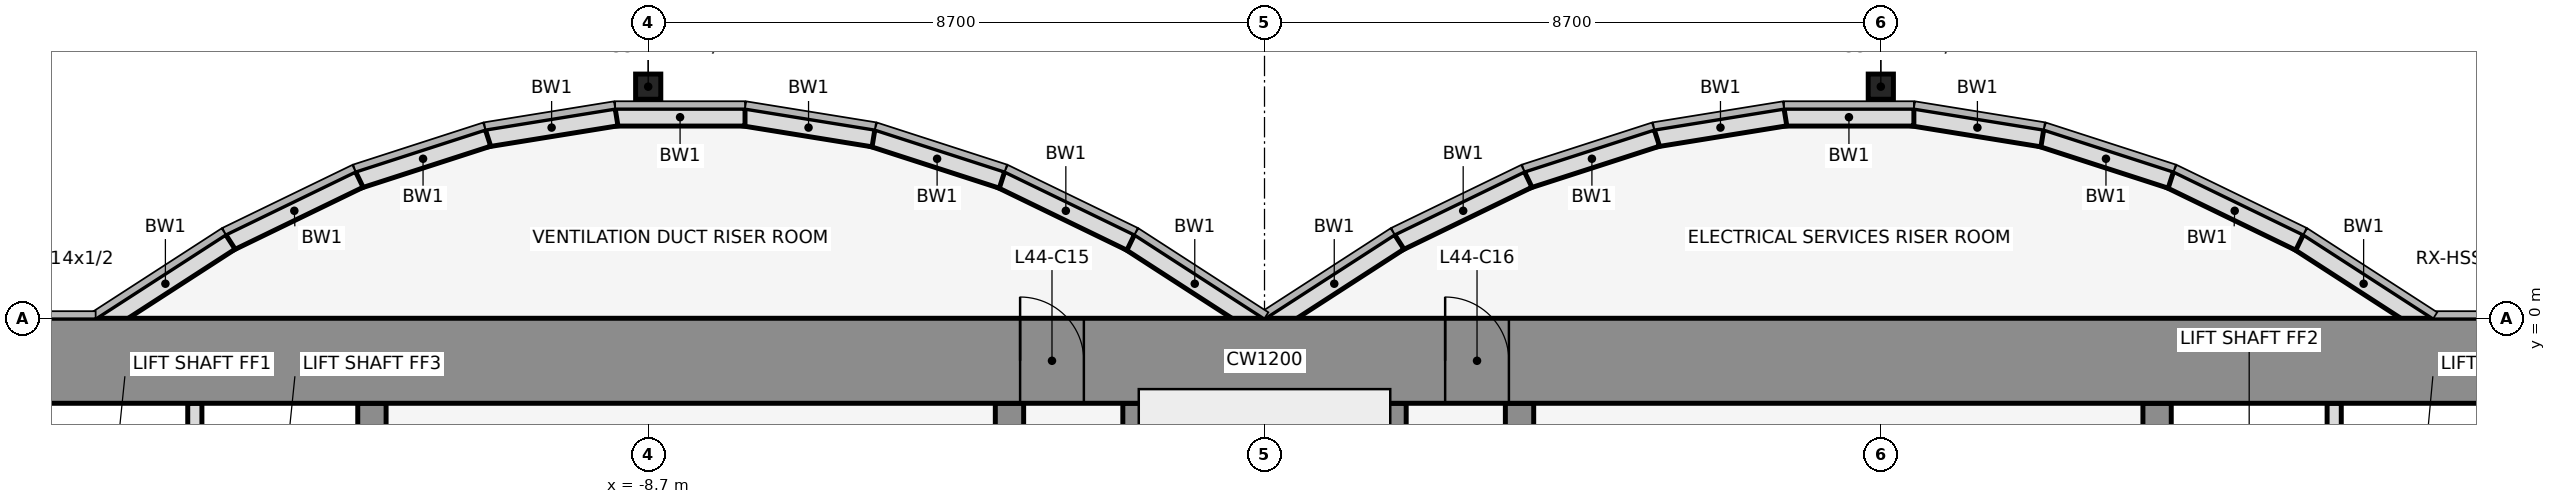
"""IFC4 building model, lengths in metres.
Left out: names, types, materials, properties, quantities, classifications, styles, units other than length and angle.
Written with IfcOpenShell. Run it as: python <this file> out.ifc"""

import sys

from ifc_helpers import new_model, si_unit, direction, frame, frame_2d, origin, origin_2d, place, context, subcontext, project, spatial, rectangle, hollow_rectangle, extrude, element, fill, save


model = new_model("IFC4")
c1 = context("Model", 3, precision=1e-05, world=origin(), true_north=direction((0.0, 1.0)))
c2 = subcontext(c1, "Body", "Model", "MODEL_VIEW")
j1 = project(units=[si_unit("LENGTHUNIT", "METRE"), si_unit("PLANEANGLEUNIT", "RADIAN")], contexts=[c1])
p1 = place(None, origin())
s1 = spatial("IfcSite", under=j1, at=p1, CompositionType="ELEMENT")
p2 = place(p1, origin())
s2 = spatial("IfcBuilding", under=s1, at=p2, CompositionType="ELEMENT")
p3 = place(p2, frame((0.0, 0.0, 199.1)))
s3 = spatial("IfcBuildingStorey", under=s2, at=p3, CompositionType="ELEMENT", Elevation=199.1)
for number, where, z_axis, x_axis in (
    (1, (-8.7, 3.269, 0.0), (0.0, 0.0, 1.0), (1.0, 0.0, 0.0)),
    (2, (8.7, 3.269, 0.0), (0.0, 0.0, 1.0), (1.0, 0.0, 0.0)),
):
    element("IfcColumn", number, at=place(p3, frame(where, z_axis=z_axis, x_axis=x_axis)), inside=s3, PredefinedType="COLUMN", context=c2, shape_type="SweptSolid", body=[
        extrude(hollow_rectangle(XDim=0.356, YDim=0.356, WallThickness=0.012, at=origin_2d()), origin(), (0.0, 0.0, 1.0), 4.1),
    ])
p4 = place(p3, frame((16.432, -0.105, 0.0), z_axis=(0.0, 0.0, 1.0), x_axis=(-0.83981312244, 0.542875602121, 0.0)))
e3 = element("IfcWall", 3, at=p4, inside=s3, PredefinedType="STANDARD", context=c2, shape_type="SweptSolid", body=[
    extrude(rectangle(XDim=2.183, YDim=0.25, at=frame_2d((1.091, 0.0))), origin(), (0.0, 0.0, 1.0), 3.95),
])
p5 = place(p3, frame((14.612, 1.073, 0.0), z_axis=(0.0, 0.0, 1.0), x_axis=(-0.89982408427, 0.436252928206, 0.0)))
e4 = element("IfcWall", 4, at=p5, inside=s3, PredefinedType="STANDARD", context=c2, shape_type="SweptSolid", body=[
    extrude(rectangle(XDim=2.038, YDim=0.25, at=frame_2d((1.019, 0.0))), origin(), (0.0, 0.0, 1.0), 3.95),
])
p6 = place(p3, frame((12.795, 1.955, 0.0), z_axis=(0.0, 0.0, 1.0), x_axis=(-0.951495806175, 0.307661714928, 0.0)))
e5 = element("IfcWall", 5, at=p6, inside=s3, PredefinedType="STANDARD", context=c2, shape_type="SweptSolid", body=[
    extrude(rectangle(XDim=1.927, YDim=0.25, at=frame_2d((0.963, 0.0))), origin(), (0.0, 0.0, 1.0), 3.95),
])
p7 = place(p3, frame((10.98, 2.543, 0.0), z_axis=(0.0, 0.0, 1.0), x_axis=(-0.987181718931, 0.159600293885, 0.0)))
e6 = element("IfcWall", 6, at=p7, inside=s3, PredefinedType="STANDARD", context=c2, shape_type="SweptSolid", body=[
    extrude(rectangle(XDim=1.857, YDim=0.25, at=frame_2d((0.929, 0.0))), origin(), (0.0, 0.0, 1.0), 3.95),
])
p8 = place(p3, frame((9.167, 2.838, 0.0), z_axis=(0.0, 0.0, 1.0), x_axis=(-1.0, 0.0, 0.0)))
e7 = element("IfcWall", 7, at=p8, inside=s3, PredefinedType="STANDARD", context=c2, shape_type="SweptSolid", body=[
    extrude(rectangle(XDim=1.833, YDim=0.25, at=frame_2d((0.917, 0.0))), origin(), (0.0, 0.0, 1.0), 3.95),
])
p9 = place(p3, frame((7.353, 2.84, 0.0), z_axis=(0.0, 0.0, 1.0), x_axis=(-0.987181718931, -0.159600293885, 0.0)))
e8 = element("IfcWall", 8, at=p9, inside=s3, PredefinedType="STANDARD", context=c2, shape_type="SweptSolid", body=[
    extrude(rectangle(XDim=1.857, YDim=0.25, at=frame_2d((0.929, 0.0))), origin(), (0.0, 0.0, 1.0), 3.95),
])
p10 = place(p3, frame((5.538, 2.548, 0.0), z_axis=(0.0, 0.0, 1.0), x_axis=(-0.951495806175, -0.307661714928, 0.0)))
e9 = element("IfcWall", 9, at=p10, inside=s3, PredefinedType="STANDARD", context=c2, shape_type="SweptSolid", body=[
    extrude(rectangle(XDim=1.927, YDim=0.25, at=frame_2d((0.963, 0.0))), origin(), (0.0, 0.0, 1.0), 3.95),
])
p11 = place(p3, frame((3.721, 1.962, 0.0), z_axis=(0.0, 0.0, 1.0), x_axis=(-0.89982408427, -0.436252928206, 0.0)))
e10 = element("IfcWall", 10, at=p11, inside=s3, PredefinedType="STANDARD", context=c2, shape_type="SweptSolid", body=[
    extrude(rectangle(XDim=2.038, YDim=0.25, at=frame_2d((1.019, 0.0))), origin(), (0.0, 0.0, 1.0), 3.95),
])
for number, where, z_axis, x_axis in (
    (11, (1.901, 1.08, 0.0), (0.0, 0.0, 1.0), (-0.84, -0.543, 0.0)),
    (12, (-0.068, -0.105, 0.0), (0.0, 0.0, 1.0), (-0.84, 0.543, 0.0)),
):
    element("IfcWall", number, at=place(p3, frame(where, z_axis=z_axis, x_axis=x_axis)), inside=s3, PredefinedType="STANDARD", context=c2, shape_type="SweptSolid", body=[
        extrude(rectangle(XDim=2.183, YDim=0.25, at=frame_2d((1.091, 0.0))), origin(), (0.0, 0.0, 1.0), 3.95),
    ])
p12 = place(p3, frame((-1.888, 1.073, 0.0), z_axis=(0.0, 0.0, 1.0), x_axis=(-0.89982408427, 0.436252928206, 0.0)))
e13 = element("IfcWall", 13, at=p12, inside=s3, PredefinedType="STANDARD", context=c2, shape_type="SweptSolid", body=[
    extrude(rectangle(XDim=2.038, YDim=0.25, at=frame_2d((1.019, 0.0))), origin(), (0.0, 0.0, 1.0), 3.95),
])
p13 = place(p3, frame((-3.705, 1.955, 0.0), z_axis=(0.0, 0.0, 1.0), x_axis=(-0.951495806175, 0.307661714928, 0.0)))
e14 = element("IfcWall", 14, at=p13, inside=s3, PredefinedType="STANDARD", context=c2, shape_type="SweptSolid", body=[
    extrude(rectangle(XDim=1.927, YDim=0.25, at=frame_2d((0.963, 0.0))), origin(), (0.0, 0.0, 1.0), 3.95),
])
p14 = place(p3, frame((-5.52, 2.543, 0.0), z_axis=(0.0, 0.0, 1.0), x_axis=(-0.987181718931, 0.159600293885, 0.0)))
e15 = element("IfcWall", 15, at=p14, inside=s3, PredefinedType="STANDARD", context=c2, shape_type="SweptSolid", body=[
    extrude(rectangle(XDim=1.857, YDim=0.25, at=frame_2d((0.929, 0.0))), origin(), (0.0, 0.0, 1.0), 3.95),
])
p15 = place(p3, frame((-7.333, 2.838, 0.0), z_axis=(0.0, 0.0, 1.0), x_axis=(-1.0, 0.0, 0.0)))
e16 = element("IfcWall", 16, at=p15, inside=s3, PredefinedType="STANDARD", context=c2, shape_type="SweptSolid", body=[
    extrude(rectangle(XDim=1.833, YDim=0.25, at=frame_2d((0.917, 0.0))), origin(), (0.0, 0.0, 1.0), 3.95),
])
p16 = place(p3, frame((-9.147, 2.84, 0.0), z_axis=(0.0, 0.0, 1.0), x_axis=(-0.987181718931, -0.159600293885, 0.0)))
e17 = element("IfcWall", 17, at=p16, inside=s3, PredefinedType="STANDARD", context=c2, shape_type="SweptSolid", body=[
    extrude(rectangle(XDim=1.857, YDim=0.25, at=frame_2d((0.929, 0.0))), origin(), (0.0, 0.0, 1.0), 3.95),
])
p17 = place(p3, frame((-10.962, 2.548, 0.0), z_axis=(0.0, 0.0, 1.0), x_axis=(-0.951495806175, -0.307661714928, 0.0)))
e18 = element("IfcWall", 18, at=p17, inside=s3, PredefinedType="STANDARD", context=c2, shape_type="SweptSolid", body=[
    extrude(rectangle(XDim=1.927, YDim=0.25, at=frame_2d((0.963, 0.0))), origin(), (0.0, 0.0, 1.0), 3.95),
])
p18 = place(p3, frame((-12.779, 1.962, 0.0), z_axis=(0.0, 0.0, 1.0), x_axis=(-0.89982408427, -0.436252928206, 0.0)))
e19 = element("IfcWall", 19, at=p18, inside=s3, PredefinedType="STANDARD", context=c2, shape_type="SweptSolid", body=[
    extrude(rectangle(XDim=2.038, YDim=0.25, at=frame_2d((1.019, 0.0))), origin(), (0.0, 0.0, 1.0), 3.95),
])
p19 = place(p3, frame((-14.599, 1.08, 0.0), z_axis=(0.0, 0.0, 1.0), x_axis=(-0.83981312244, -0.542875602121, 0.0)))
e20 = element("IfcWall", 20, at=p19, inside=s3, PredefinedType="STANDARD", context=c2, shape_type="SweptSolid", body=[
    extrude(rectangle(XDim=2.183, YDim=0.25, at=frame_2d((1.091, 0.0))), origin(), (0.0, 0.0, 1.0), 3.95),
])
p20 = place(p3, frame((-15.1, -4.6, 0.0), z_axis=(0.0, 0.0, 1.0), x_axis=(0.0, 1.0, 0.0)))
e21 = element("IfcWall", 21, at=p20, inside=s3, PredefinedType="PARTITIONING", context=c2, shape_type="SweptSolid", body=[
    extrude(rectangle(XDim=3.4, YDim=0.2, at=frame_2d((1.7, 0.0))), origin(), (0.0, 0.0, 1.0), 2.84),
])
p21 = place(p3, frame((-12.6, -11.8, 0.0), z_axis=(0.0, 0.0, 1.0), x_axis=(0.0, 1.0, 0.0)))
e22 = element("IfcWall", 22, at=p21, inside=s3, PredefinedType="SHEAR", context=c2, shape_type="SweptSolid", body=[
    extrude(rectangle(XDim=10.6, YDim=0.4, at=frame_2d((5.3, 0.0))), origin(), (0.0, 0.0, 1.0), 4.1),
])
p22 = place(p21, frame((4.75, 0.0, 0.0)))
e23 = element("IfcOpeningElement", 23, at=p22, cuts=e22, PredefinedType="OPENING", context=c2, shape_type="SweptSolid", body=[
    extrude(rectangle(XDim=1.1, YDim=2.1, at=frame_2d((0.55, 1.05))), frame((0.0, 0.212, 0.0), z_axis=(0.0, -1.0, 0.0), x_axis=(1.0, 0.0, 0.0)), (0.0, 0.0, 1.0), 0.424),
])
p23 = place(p3, frame((-3.6, -11.8, 0.0), z_axis=(0.0, 0.0, 1.0), x_axis=(0.0, 1.0, 0.0)))
e24 = element("IfcWall", 24, at=p23, inside=s3, PredefinedType="SHEAR", context=c2, shape_type="SweptSolid", body=[
    extrude(rectangle(XDim=10.6, YDim=0.4, at=frame_2d((5.3, 0.0))), origin(), (0.0, 0.0, 1.0), 4.1),
])
p24 = place(p23, frame((4.85, 0.0, 0.0)))
e25 = element("IfcOpeningElement", 25, at=p24, cuts=e24, PredefinedType="OPENING", context=c2, shape_type="SweptSolid", body=[
    extrude(rectangle(XDim=0.9, YDim=2.1, at=frame_2d((0.45, 1.05))), frame((0.0, 0.212, 0.0), z_axis=(0.0, -1.0, 0.0), x_axis=(1.0, 0.0, 0.0)), (0.0, 0.0, 1.0), 0.424),
])
for number, where, z_axis, x_axis in (
    (26, (-1.8, -11.8, 0.0), (0.0, 0.0, 1.0), (0.0, 1.0, 0.0)),
    (27, (1.8, -11.8, 0.0), (0.0, 0.0, 1.0), (0.0, 1.0, 0.0)),
):
    element("IfcWall", number, at=place(p3, frame(where, z_axis=z_axis, x_axis=x_axis)), inside=s3, PredefinedType="SHEAR", context=c2, shape_type="SweptSolid", body=[
        extrude(rectangle(XDim=10.6, YDim=0.4, at=frame_2d((5.3, 0.0))), origin(), (0.0, 0.0, 1.0), 4.1),
    ])
p25 = place(p3, frame((3.6, -11.8, 0.0), z_axis=(0.0, 0.0, 1.0), x_axis=(0.0, 1.0, 0.0)))
e28 = element("IfcWall", 28, at=p25, inside=s3, PredefinedType="SHEAR", context=c2, shape_type="SweptSolid", body=[
    extrude(rectangle(XDim=10.6, YDim=0.4, at=frame_2d((5.3, 0.0))), origin(), (0.0, 0.0, 1.0), 4.1),
])
p26 = place(p25, frame((1.35, 0.0, 0.0)))
e29 = element("IfcOpeningElement", 29, at=p26, cuts=e28, PredefinedType="OPENING", context=c2, shape_type="SweptSolid", body=[
    extrude(rectangle(XDim=0.9, YDim=2.1, at=frame_2d((0.45, 1.05))), frame((0.0, 0.212, 0.0), z_axis=(0.0, -1.0, 0.0), x_axis=(1.0, 0.0, 0.0)), (0.0, 0.0, 1.0), 0.424),
])
p27 = place(p3, frame((12.6, -11.8, 0.0), z_axis=(0.0, 0.0, 1.0), x_axis=(0.0, 1.0, 0.0)))
e30 = element("IfcWall", 30, at=p27, inside=s3, PredefinedType="SHEAR", context=c2, shape_type="SweptSolid", body=[
    extrude(rectangle(XDim=10.6, YDim=0.4, at=frame_2d((5.3, 0.0))), origin(), (0.0, 0.0, 1.0), 4.1),
])
p28 = place(p27, frame((1.25, 0.0, 0.0)))
e31 = element("IfcOpeningElement", 31, at=p28, cuts=e30, PredefinedType="OPENING", context=c2, shape_type="SweptSolid", body=[
    extrude(rectangle(XDim=1.2, YDim=2.1, at=frame_2d((0.6, 1.05))), frame((0.0, 0.212, 0.0), z_axis=(0.0, -1.0, 0.0), x_axis=(1.0, 0.0, 0.0)), (0.0, 0.0, 1.0), 0.424),
])
p29 = place(p27, frame((4.75, 0.0, 0.0)))
e32 = element("IfcOpeningElement", 32, at=p29, cuts=e30, PredefinedType="OPENING", context=c2, shape_type="SweptSolid", body=[
    extrude(rectangle(XDim=1.1, YDim=2.1, at=frame_2d((0.55, 1.05))), frame((0.0, 0.212, 0.0), z_axis=(0.0, -1.0, 0.0), x_axis=(1.0, 0.0, 0.0)), (0.0, 0.0, 1.0), 0.424),
])
p30 = place(p3, frame((15.1, -4.6, 0.0), z_axis=(0.0, 0.0, 1.0), x_axis=(0.0, 1.0, 0.0)))
e33 = element("IfcWall", 33, at=p30, inside=s3, PredefinedType="PARTITIONING", context=c2, shape_type="SweptSolid", body=[
    extrude(rectangle(XDim=3.4, YDim=0.2, at=frame_2d((1.7, 0.0))), origin(), (0.0, 0.0, 1.0), 2.84),
])
p31 = place(p3, frame((-22.0, -0.6, 0.0), z_axis=(0.0, 0.0, 1.0), x_axis=(1.0, 0.0, 0.0)))
e34 = element("IfcWall", 34, at=p31, inside=s3, PredefinedType="SHEAR", context=c2, shape_type="SweptSolid", body=[
    extrude(rectangle(XDim=44.0, YDim=1.2, at=frame_2d((22.0, 0.0))), origin(), (0.0, 0.0, 1.0), 4.1),
])
p32 = place(p31, frame((18.55, 0.0, 0.0)))
e35 = element("IfcOpeningElement", 35, at=p32, cuts=e34, PredefinedType="OPENING", context=c2, shape_type="SweptSolid", body=[
    extrude(rectangle(XDim=0.9, YDim=2.1, at=frame_2d((0.45, 1.05))), frame((0.0, 0.612, 0.0), z_axis=(0.0, -1.0, 0.0), x_axis=(1.0, 0.0, 0.0)), (0.0, 0.0, 1.0), 1.224),
])
p33 = place(p31, frame((24.55, 0.0, 0.0)))
e36 = element("IfcOpeningElement", 36, at=p33, cuts=e34, PredefinedType="OPENING", context=c2, shape_type="SweptSolid", body=[
    extrude(rectangle(XDim=0.9, YDim=2.1, at=frame_2d((0.45, 1.05))), frame((0.0, 0.612, 0.0), z_axis=(0.0, -1.0, 0.0), x_axis=(1.0, 0.0, 0.0)), (0.0, 0.0, 1.0), 1.224),
])
p34 = place(p32, origin())
e37 = element("IfcDoor", 37, at=p34, inside=s3, OperationType="SINGLE_SWING_LEFT", PredefinedType="DOOR", context=c2, shape_type="SweptSolid", body=[
    extrude(rectangle(XDim=0.9, YDim=2.1, at=frame_2d((0.45, 1.05))), frame((0.0, 0.025, 0.0), z_axis=(0.0, -1.0, 0.0), x_axis=(1.0, 0.0, 0.0)), (0.0, 0.0, 1.0), 0.05),
])
fill(e35, e37)
p35 = place(p33, origin())
e38 = element("IfcDoor", 38, at=p35, inside=s3, OperationType="SINGLE_SWING_LEFT", PredefinedType="DOOR", context=c2, shape_type="SweptSolid", body=[
    extrude(rectangle(XDim=0.9, YDim=2.1, at=frame_2d((0.45, 1.05))), frame((0.0, 0.025, 0.0), z_axis=(0.0, -1.0, 0.0), x_axis=(1.0, 0.0, 0.0)), (0.0, 0.0, 1.0), 0.05),
])
fill(e36, e38)
save(model, sys.argv[1])
